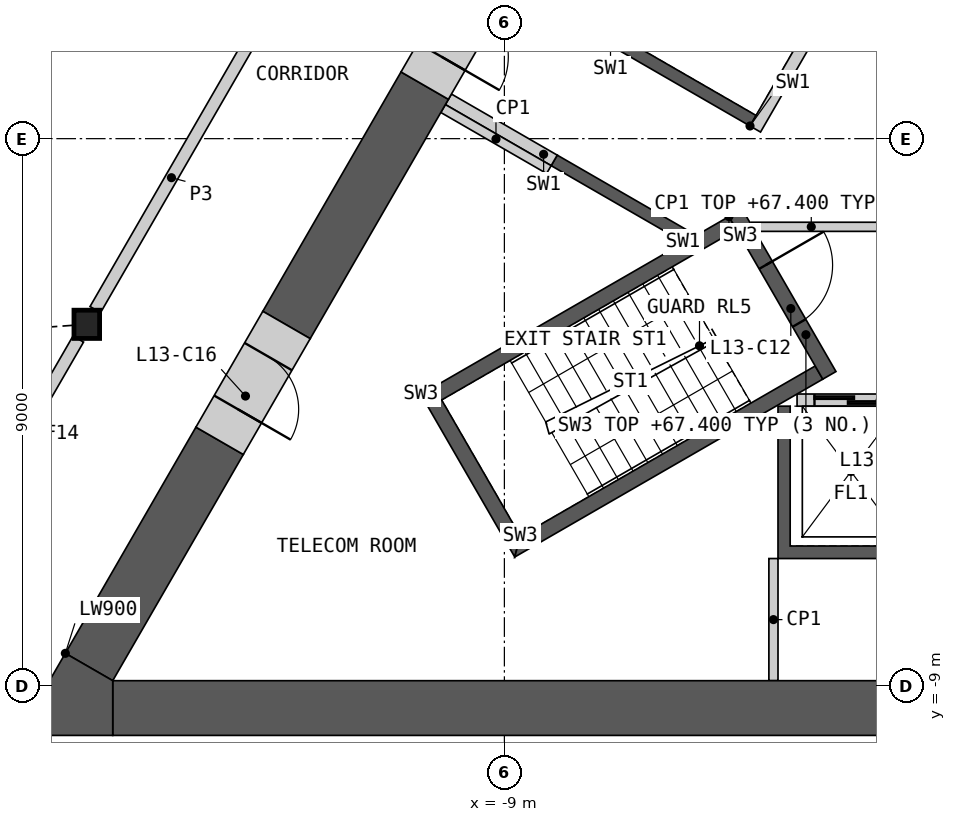
"""IFC4 building model, lengths in metres.
Left out: names, types, materials, properties, quantities, classifications, styles, units other than length and angle.
Written with IfcOpenShell. Run it as: python <this file> out.ifc"""

import sys

from ifc_helpers import new_model, si_unit, direction, frame, frame_2d, origin, origin_2d, place, context, subcontext, project, spatial, polyline, rectangle, i_section, outline, extrude, element, fill, save


model = new_model("IFC4")
c1 = context("Model", 3, precision=1e-05, world=origin(), true_north=direction((0.0, 1.0)))
c2 = subcontext(c1, "Body", "Model", "MODEL_VIEW")
j1 = project(units=[si_unit("LENGTHUNIT", "METRE"), si_unit("PLANEANGLEUNIT", "RADIAN")], contexts=[c1])
p1 = place(None, origin())
s1 = spatial("IfcSite", under=j1, at=p1, CompositionType="ELEMENT")
p2 = place(p1, origin())
s2 = spatial("IfcBuilding", under=s1, at=p2, CompositionType="ELEMENT")
p3 = place(p2, frame((0.0, 0.0, 63.6)))
s3 = spatial("IfcBuildingStorey", under=s2, at=p3, CompositionType="ELEMENT", Elevation=63.6)
p4 = place(p3, frame((-15.868, -3.054, 0.0), z_axis=(0.0, 0.0, 1.0), x_axis=(1.0, 0.0, 0.0)))
e1 = element("IfcColumn", 1, at=p4, inside=s3, PredefinedType="COLUMN", context=c2, shape_type="SweptSolid", body=[
    extrude(i_section(OverallWidth=0.421, OverallDepth=0.465, WebThickness=0.045, FlangeThickness=0.072, at=origin_2d()), origin(), (0.0, 0.0, 1.0), 4.2),
])
p5 = place(p3, origin())
e2 = element("IfcWall", 2, at=p5, inside=s3, PredefinedType="SHEAR", context=c2, shape_type="SweptSolid", body=[
    extrude(outline(polyline([(4.5, -4.4), (4.5, -6.906), (-4.5, -6.906), (-4.5, -4.4), (-4.3, -4.4), (-4.3, -6.7), (-2.3, -6.7), (-2.3, -4.4), (-2.1, -4.4), (-2.1, -6.7), (-0.1, -6.7), (-0.1, -4.4), (0.1, -4.4), (0.1, -6.7), (2.1, -6.7), (2.1, -4.4), (2.3, -4.4), (2.3, -6.7), (4.3, -6.7), (4.3, -4.4), (4.5, -4.4)])), origin(), (0.0, 0.0, 1.0), 3.8),
])
p6 = place(p3, frame((-4.187, -4.3, 0.0), z_axis=(0.0, 0.0, 1.0), x_axis=(1.0, 0.0, 0.0)))
e3 = element("IfcWall", 3, at=p6, inside=s3, PredefinedType="SOLIDWALL", context=c2, shape_type="SweptSolid", body=[
    extrude(rectangle(XDim=8.373, YDim=0.2, at=frame_2d((4.187, 0.0))), origin(), (0.0, 0.0, 1.0), 3.8),
])
p7 = place(p6, frame((0.287, 0.0, 0.0)))
e4 = element("IfcOpeningElement", 4, at=p7, cuts=e3, PredefinedType="OPENING", context=c2, shape_type="SweptSolid", body=[
    extrude(rectangle(XDim=1.2, YDim=2.1, at=frame_2d((0.6, 1.05))), frame((0.0, 0.11, 0.0), z_axis=(0.0, -1.0, 0.0), x_axis=(1.0, 0.0, 0.0)), (0.0, 0.0, 1.0), 0.22),
])
p8 = place(p6, frame((2.387, 0.0, 0.0)))
e5 = element("IfcOpeningElement", 5, at=p8, cuts=e3, PredefinedType="OPENING", context=c2, shape_type="SweptSolid", body=[
    extrude(rectangle(XDim=1.4, YDim=2.1, at=frame_2d((0.7, 1.05))), frame((0.0, 0.11, 0.0), z_axis=(0.0, -1.0, 0.0), x_axis=(1.0, 0.0, 0.0)), (0.0, 0.0, 1.0), 0.22),
])
p9 = place(p6, frame((4.737, 0.0, 0.0)))
e6 = element("IfcOpeningElement", 6, at=p9, cuts=e3, PredefinedType="OPENING", context=c2, shape_type="SweptSolid", body=[
    extrude(rectangle(XDim=1.1, YDim=2.1, at=frame_2d((0.55, 1.05))), frame((0.0, 0.11, 0.0), z_axis=(0.0, -1.0, 0.0), x_axis=(1.0, 0.0, 0.0)), (0.0, 0.0, 1.0), 0.22),
])
p10 = place(p6, frame((6.887, 0.0, 0.0)))
e7 = element("IfcOpeningElement", 7, at=p10, cuts=e3, PredefinedType="OPENING", context=c2, shape_type="SweptSolid", body=[
    extrude(rectangle(XDim=1.2, YDim=2.1, at=frame_2d((0.6, 1.05))), frame((0.0, 0.11, 0.0), z_axis=(0.0, -1.0, 0.0), x_axis=(1.0, 0.0, 0.0)), (0.0, 0.0, 1.0), 0.22),
])
p11 = place(p3, origin())
e8 = element("IfcWall", 8, at=p11, inside=s3, PredefinedType="SHEAR", context=c2, shape_type="SweptSolid", body=[
    extrude(outline(polyline([(-6.061, -1.697), (-8.231, -0.444), (-8.131, -0.271), (-5.96, -1.524), (-6.061, -1.697)])), origin(), (0.0, 0.0, 1.0), 3.8),
])
p12 = place(p3, origin())
e9 = element("IfcWall", 9, at=p12, inside=s3, PredefinedType="SHEAR", context=c2, shape_type="SweptSolid", body=[
    extrude(outline(polyline([(-4.96, 0.208), (-7.131, 1.461), (-5.931, 3.54), (-3.76, 2.287), (-3.861, 2.113), (-5.852, 3.263), (-6.852, 1.531), (-4.861, 0.381), (-4.96, 0.208)])), origin(), (0.0, 0.0, 1.0), 3.8),
])
p13 = place(p3, frame((-1.631, 5.776, 0.0), z_axis=(0.0, 0.0, 1.0), x_axis=(-0.499992876559, -0.866029516466, 0.0)))
e10 = element("IfcWall", 10, at=p13, inside=s3, PredefinedType="SOLIDWALL", context=c2, shape_type="SweptSolid", body=[
    extrude(rectangle(XDim=6.486, YDim=0.2, at=frame_2d((3.243, 0.0))), origin(), (0.0, 0.0, 1.0), 3.8),
])
p14 = place(p13, frame((0.437, 0.0, 0.0)))
e11 = element("IfcOpeningElement", 11, at=p14, cuts=e10, PredefinedType="OPENING", context=c2, shape_type="SweptSolid", body=[
    extrude(rectangle(XDim=0.9, YDim=2.1, at=frame_2d((0.45, 1.05))), frame((0.0, 0.11, 0.0), z_axis=(0.0, -1.0, 0.0), x_axis=(1.0, 0.0, 0.0)), (0.0, 0.0, 1.0), 0.22),
])
p15 = place(p13, frame((2.637, 0.0, 0.0)))
e12 = element("IfcOpeningElement", 12, at=p15, cuts=e10, PredefinedType="OPENING", context=c2, shape_type="SweptSolid", body=[
    extrude(rectangle(XDim=0.9, YDim=2.1, at=frame_2d((0.45, 1.05))), frame((0.0, 0.11, 0.0), z_axis=(0.0, -1.0, 0.0), x_axis=(1.0, 0.0, 0.0)), (0.0, 0.0, 1.0), 0.22),
])
p16 = place(p3, frame((-8.181, -0.357, 0.0), z_axis=(0.0, 0.0, 1.0), x_axis=(-0.866035824272, 0.499981950752, 0.0)))
e13 = element("IfcWall", 13, at=p16, inside=s3, PredefinedType="SHEAR", context=c2, shape_type="SweptSolid", body=[
    extrude(rectangle(XDim=2.009, YDim=0.2, at=frame_2d((1.004, 0.0))), origin(), (0.0, 0.0, 1.0), 3.8),
])
p17 = place(p3, frame((-4.941, -1.45, 0.0), z_axis=(0.0, 0.0, 1.0), x_axis=(1.0, 0.0, 0.0)))
e14 = element("IfcWall", 14, at=p17, inside=s3, PredefinedType="PARTITIONING", context=c2, shape_type="SweptSolid", body=[
    extrude(rectangle(XDim=9.882, YDim=0.15, at=frame_2d((4.941, 0.0))), origin(), (0.0, 0.0, 1.0), 3.8),
])
p18 = place(p17, frame((4.391, 0.0, 0.0)))
e15 = element("IfcOpeningElement", 15, at=p18, cuts=e14, PredefinedType="OPENING", context=c2, shape_type="SweptSolid", body=[
    extrude(rectangle(XDim=1.1, YDim=2.1, at=frame_2d((0.55, 1.05))), frame((0.0, 0.085, 0.0), z_axis=(0.0, -1.0, 0.0), x_axis=(1.0, 0.0, 0.0)), (0.0, 0.0, 1.0), 0.17),
])
p19 = place(p3, origin())
e16 = element("IfcWall", 16, at=p19, inside=s3, PredefinedType="SHEAR", context=c2, shape_type="SweptSolid", body=[
    extrude(outline(polyline([(-5.307, -1.281), (-10.374, -4.206), (-10.032, -4.298), (-5.182, -1.498), (-5.307, -1.281)])), origin(), (0.0, 0.0, 1.0), 3.8),
])
p20 = place(p3, origin())
e17 = element("IfcWall", 17, at=p20, inside=s3, PredefinedType="SHEAR", context=c2, shape_type="SweptSolid", body=[
    extrude(outline(polyline([(-10.374, -4.206), (-8.83, -6.881), (-8.738, -6.539), (-10.032, -4.298), (-10.374, -4.206)])), origin(), (0.0, 0.0, 1.0), 3.8),
])
p21 = place(p3, origin())
e18 = element("IfcWall", 18, at=p21, inside=s3, PredefinedType="SHEAR", context=c2, shape_type="SweptSolid", body=[
    extrude(outline(polyline([(-8.738, -6.539), (-8.83, -6.881), (-3.763, -3.956), (-3.888, -3.739), (-8.738, -6.539)])), origin(), (0.0, 0.0, 1.0), 3.8),
])
p22 = place(p3, frame((-5.199, -1.219, 0.0), z_axis=(0.0, 0.0, 1.0), x_axis=(0.499982516597, -0.866035497597, 0.0)))
e19 = element("IfcWall", 19, at=p22, inside=s3, PredefinedType="SHEAR", context=c2, shape_type="SweptSolid", body=[
    extrude(rectangle(XDim=3.088, YDim=0.25, at=frame_2d((1.544, 0.0))), origin(), (0.0, 0.0, 1.0), 3.8),
])
p23 = place(p22, frame((0.994, 0.0, 0.0)))
e20 = element("IfcOpeningElement", 20, at=p23, cuts=e19, PredefinedType="OPENING", context=c2, shape_type="SweptSolid", body=[
    extrude(rectangle(XDim=1.1, YDim=2.1, at=frame_2d((0.55, 1.05))), frame((0.0, 0.135, 0.0), z_axis=(0.0, -1.0, 0.0), x_axis=(1.0, 0.0, 0.0)), (0.0, 0.0, 1.0), 0.27),
])
p24 = place(p3, frame((-4.575, -6.906, 0.0), z_axis=(0.0, 0.0, 1.0), x_axis=(0.0, -1.0, 0.0)))
e21 = element("IfcWall", 21, at=p24, inside=s3, PredefinedType="PARTITIONING", context=c2, shape_type="SweptSolid", body=[
    extrude(rectangle(XDim=2.009, YDim=0.15, at=frame_2d((1.004, 0.0))), origin(), (0.0, 0.0, 1.0), 3.8),
])
p25 = place(p3, frame((-8.268, -0.509, 0.0), z_axis=(0.0, 0.0, 1.0), x_axis=(-0.866035824272, 0.499981950752, 0.0)))
e22 = element("IfcWall", 22, at=p25, inside=s3, PredefinedType="PARTITIONING", context=c2, shape_type="SweptSolid", body=[
    extrude(rectangle(XDim=2.009, YDim=0.15, at=frame_2d((1.004, 0.0))), origin(), (0.0, 0.0, 1.0), 3.8),
])
p26 = place(p3, frame((-15.441, -9.365, 0.0), z_axis=(0.0, 0.0, 1.0), x_axis=(1.0, 0.0, 0.0)))
e23 = element("IfcWall", 23, at=p26, inside=s3, PredefinedType="SHEAR", context=c2, shape_type="SweptSolid", body=[
    extrude(rectangle(XDim=14.341, YDim=0.9, at=frame_2d((7.17, 0.0))), origin(), (0.0, 0.0, 1.0), 3.8),
])
p27 = place(p3, frame((-10.31, 0.872, 0.0), z_axis=(0.0, 0.0, 1.0), x_axis=(-0.499968858743, -0.866043382451, 0.0)))
e24 = element("IfcWall", 24, at=p27, inside=s3, PredefinedType="SHEAR", context=c2, shape_type="SweptSolid", body=[
    extrude(rectangle(XDim=4.546, YDim=0.9, at=frame_2d((2.273, 0.0))), origin(), (0.0, 0.0, 1.0), 3.8),
])
p28 = place(p3, frame((-13.683, -4.97, 0.0), z_axis=(0.0, 0.0, 1.0), x_axis=(-0.499996331799, -0.866027521611, 0.0)))
e25 = element("IfcWall", 25, at=p28, inside=s3, PredefinedType="SHEAR", context=c2, shape_type="SweptSolid", body=[
    extrude(rectangle(XDim=4.295, YDim=0.9, at=frame_2d((2.148, 0.0))), origin(), (0.0, 0.0, 1.0), 3.8),
])
p29 = place(p3, origin())
e26 = element("IfcWall", 26, at=p29, inside=s3, PredefinedType="SHEAR", context=c2, shape_type="SweptSolid", body=[
    extrude(outline(polyline([(-16.221, -8.465), (-15.441, -8.915), (-15.441, -9.815), (-17.0, -9.815), (-16.221, -8.465)])), origin(), (0.0, 0.0, 1.0), 3.8),
])
p30 = place(p3, frame((-12.583, -3.065, 0.0), z_axis=(0.0, 0.0, 1.0), x_axis=(-0.50002983664, -0.866008176907, 0.0)))
e27 = element("IfcWall", 27, at=p30, inside=s3, PredefinedType="SHEAR", context=c2, shape_type="SweptSolid", body=[
    extrude(rectangle(XDim=2.2, YDim=0.9, at=frame_2d((1.1, 0.0))), origin(), (0.0, 0.0, 1.0), 3.8),
])
p31 = place(p30, frame((0.6, 0.0, 0.0)))
e28 = element("IfcOpeningElement", 28, at=p31, cuts=e27, PredefinedType="OPENING", context=c2, shape_type="SweptSolid", body=[
    extrude(rectangle(XDim=1.0, YDim=2.1, at=frame_2d((0.5, 1.05))), frame((0.0, 0.46, 0.0), z_axis=(0.0, -1.0, 0.0), x_axis=(1.0, 0.0, 0.0)), (0.0, 0.0, 1.0), 0.92),
])
p32 = place(p3, frame((-9.21, 2.777, 0.0), z_axis=(0.0, 0.0, 1.0), x_axis=(-0.500077893725, -0.86598042715, 0.0)))
e29 = element("IfcWall", 29, at=p32, inside=s3, PredefinedType="SHEAR", context=c2, shape_type="SweptSolid", body=[
    extrude(rectangle(XDim=2.2, YDim=0.9, at=frame_2d((1.1, 0.0))), origin(), (0.0, 0.0, 1.0), 3.8),
])
p33 = place(p32, frame((0.55, 0.0, 0.0)))
e30 = element("IfcOpeningElement", 30, at=p33, cuts=e29, PredefinedType="OPENING", context=c2, shape_type="SweptSolid", body=[
    extrude(rectangle(XDim=1.1, YDim=2.1, at=frame_2d((0.55, 1.05))), frame((0.0, 0.46, 0.0), z_axis=(0.0, -1.0, 0.0), x_axis=(1.0, 0.0, 0.0)), (0.0, 0.0, 1.0), 0.92),
])
p34 = place(p3, frame((-15.728, -2.811, 0.0), z_axis=(0.0, 0.0, 1.0), x_axis=(0.49999175339, 0.866030164915, 0.0)))
e31 = element("IfcWall", 31, at=p34, inside=s3, PredefinedType="PARTITIONING", context=c2, shape_type="SweptSolid", body=[
    extrude(rectangle(XDim=10.019, YDim=0.2, at=frame_2d((5.009, 0.0))), origin(), (0.0, 0.0, 1.0), 3.8),
])
p35 = place(p34, frame((7.266, 0.0, 0.0)))
e32 = element("IfcOpeningElement", 32, at=p35, cuts=e31, PredefinedType="OPENING", context=c2, shape_type="SweptSolid", body=[
    extrude(rectangle(XDim=1.0, YDim=2.1, at=frame_2d((0.5, 1.05))), frame((0.0, 0.11, 0.0), z_axis=(0.0, -1.0, 0.0), x_axis=(1.0, 0.0, 0.0)), (0.0, 0.0, 1.0), 0.22),
])
p36 = place(p3, frame((-19.244, -8.902, 0.0), z_axis=(0.0, 0.0, 1.0), x_axis=(0.499984737558, 0.86603421538, 0.0)))
e33 = element("IfcWall", 33, at=p36, inside=s3, PredefinedType="PARTITIONING", context=c2, shape_type="SweptSolid", body=[
    extrude(rectangle(XDim=6.473, YDim=0.2, at=frame_2d((3.236, 0.0))), origin(), (0.0, 0.0, 1.0), 3.8),
])
p37 = place(p36, frame((2.387, 0.0, 0.0)))
e34 = element("IfcOpeningElement", 34, at=p37, cuts=e33, PredefinedType="OPENING", context=c2, shape_type="SweptSolid", body=[
    extrude(rectangle(XDim=1.8, YDim=2.1, at=frame_2d((0.9, 1.05))), frame((0.0, 0.11, 0.0), z_axis=(0.0, -1.0, 0.0), x_axis=(1.0, 0.0, 0.0)), (0.0, 0.0, 1.0), 0.22),
])
p38 = place(p7, origin())
e35 = element("IfcDoor", 35, at=p38, inside=s3, OperationType="SLIDING_TO_LEFT", PredefinedType="DOOR", context=c2, shape_type="SweptSolid", body=[
    extrude(rectangle(XDim=1.2, YDim=2.1, at=frame_2d((0.6, 1.05))), frame((0.0, 0.025, 0.0), z_axis=(0.0, -1.0, 0.0), x_axis=(1.0, 0.0, 0.0)), (0.0, 0.0, 1.0), 0.05),
])
fill(e4, e35)
p39 = place(p23, origin())
e36 = element("IfcDoor", 36, at=p39, inside=s3, OperationType="SINGLE_SWING_LEFT", PredefinedType="DOOR", context=c2, shape_type="SweptSolid", body=[
    extrude(rectangle(XDim=1.1, YDim=2.1, at=frame_2d((0.55, 1.05))), frame((0.0, 0.025, 0.0), z_axis=(0.0, -1.0, 0.0), x_axis=(1.0, 0.0, 0.0)), (0.0, 0.0, 1.0), 0.05),
])
fill(e20, e36)
p40 = place(p31, origin())
e37 = element("IfcDoor", 37, at=p40, inside=s3, OperationType="SINGLE_SWING_RIGHT", PredefinedType="DOOR", context=c2, shape_type="SweptSolid", body=[
    extrude(rectangle(XDim=1.0, YDim=2.1, at=frame_2d((0.5, 1.05))), frame((0.0, 0.205, 0.0), z_axis=(0.0, -1.0, 0.0), x_axis=(1.0, 0.0, 0.0)), (0.0, 0.0, 1.0), 0.05),
])
fill(e28, e37)
p41 = place(p33, origin())
e38 = element("IfcDoor", 38, at=p41, inside=s3, OperationType="SINGLE_SWING_RIGHT", PredefinedType="DOOR", context=c2, shape_type="SweptSolid", body=[
    extrude(rectangle(XDim=1.1, YDim=2.1, at=frame_2d((0.55, 1.05))), frame((0.0, 0.205, 0.0), z_axis=(0.0, -1.0, 0.0), x_axis=(1.0, 0.0, 0.0)), (0.0, 0.0, 1.0), 0.05),
])
fill(e30, e38)
save(model, sys.argv[1])
